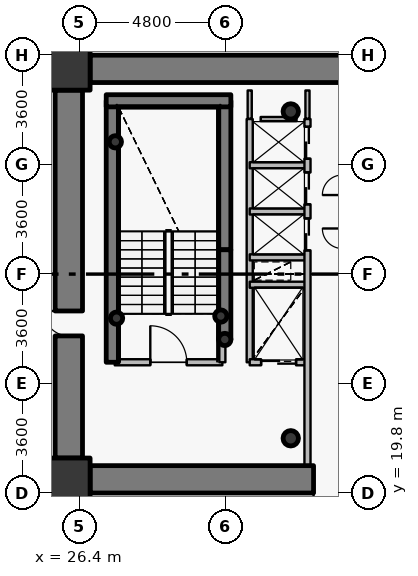
"""IFC4 building model, lengths in metres.
Left out: names, types, materials, properties, quantities, classifications, styles, units other than length and angle.
Written with IfcOpenShell. Run it as: python <this file> out.ifc"""

import sys

from ifc_helpers import new_model, si_unit, direction, frame, frame_2d, origin, origin_2d, place, context, subcontext, project, spatial, rectangle, hollow_circle, extrude, source, transform, mapped, element, fill, save


model = new_model("IFC4")
c1 = context("Model", 3, precision=1e-05, world=origin(), true_north=direction((0.0, 1.0)))
c2 = subcontext(c1, "Body", "Model", "MODEL_VIEW")
j1 = project(units=[si_unit("LENGTHUNIT", "METRE"), si_unit("PLANEANGLEUNIT", "RADIAN")], contexts=[c1])
p1 = place(None, origin())
s1 = spatial("IfcSite", under=j1, at=p1, CompositionType="ELEMENT")
p2 = place(p1, origin())
s2 = spatial("IfcBuilding", under=s1, at=p2, CompositionType="ELEMENT")
p3 = place(p2, origin())
s3 = spatial("IfcBuildingStorey", under=s2, at=p3, CompositionType="ELEMENT", Elevation=0.0)
for number, where, z_axis, x_axis in (
    (1, (26.05, 20.25, 0.0), (0.0, 0.0, 1.0), (1.0, 0.0, 0.0)),
    (2, (26.05, 33.75, 0.0), (0.0, 0.0, 1.0), (1.0, 0.0, 0.0)),
):
    element("IfcColumn", number, at=place(p3, frame(where, z_axis=z_axis, x_axis=x_axis)), inside=s3, PredefinedType="COLUMN", context=c2, shape_type="SweptSolid", body=[
        extrude(rectangle(XDim=1.4, YDim=1.4, at=origin_2d()), origin(), (0.0, 0.0, 1.0), 6.0),
    ])
for number, where, z_axis, x_axis in (
    (3, (33.35, 21.6, 0.0), (0.0, 0.0, 1.0), (1.0, 0.0, 0.0)),
    (4, (33.35, 32.35, 0.0), (0.0, 0.0, 1.0), (1.0, 0.0, 0.0)),
):
    element("IfcColumn", number, at=place(p3, frame(where, z_axis=z_axis, x_axis=x_axis)), inside=s3, PredefinedType="COLUMN", context=c2, shape_type="SweptSolid", body=[
        extrude(hollow_circle(Radius=0.254, WallThickness=0.02, at=origin_2d()), origin(), (0.0, 0.0, 1.0), 6.0),
    ])
p4 = place(p3, frame((27.48, 24.1, 0.0), z_axis=(0.0, 0.0, 1.0), x_axis=(0.0, 1.0, 0.0)))
e5 = element("IfcWall", 5, at=p4, inside=s3, PredefinedType="SHEAR", context=c2, shape_type="SweptSolid", body=[
    extrude(rectangle(XDim=8.6, YDim=0.4, at=frame_2d((4.3, 0.0))), origin(), (0.0, 0.0, 1.0), 6.0),
])
p5 = place(p3, frame((31.18, 27.8, 0.0), z_axis=(0.0, 0.0, 1.0), x_axis=(0.0, 1.0, 0.0)))
e6 = element("IfcWall", 6, at=p5, inside=s3, PredefinedType="SHEAR", context=c2, shape_type="SweptSolid", body=[
    extrude(rectangle(XDim=4.9, YDim=0.4, at=frame_2d((2.45, 0.0))), origin(), (0.0, 0.0, 1.0), 6.0),
])
p6 = place(p3, frame((27.28, 32.7, 0.0), z_axis=(0.0, 0.0, 1.0), x_axis=(1.0, 0.0, 0.0)))
e7 = element("IfcWall", 7, at=p6, inside=s3, PredefinedType="SHEAR", context=c2, shape_type="SweptSolid", body=[
    extrude(rectangle(XDim=4.1, YDim=0.4, at=frame_2d((2.05, 0.0))), origin(), (0.0, 0.0, 1.0), 6.0),
])
for number, where, z_axis, x_axis in (
    (8, (27.58, 31.35, 0.0), (0.0, 0.0, 1.0), (1.0, 0.0, 0.0)),
    (9, (31.05, 25.62, 0.0), (0.0, 0.0, 1.0), (1.0, 0.0, 0.0)),
    (10, (31.18, 24.85, 0.0), (0.0, 0.0, 1.0), (1.0, 0.0, 0.0)),
    (11, (27.62, 25.55, 0.0), (0.0, 0.0, 1.0), (1.0, 0.0, 0.0)),
):
    element("IfcColumn", number, at=place(p3, frame(where, z_axis=z_axis, x_axis=x_axis)), inside=s3, PredefinedType="COLUMN", context=c2, shape_type="SweptSolid", body=[
        extrude(hollow_circle(Radius=0.203, WallThickness=0.016, at=origin_2d()), origin(), (0.0, 0.0, 1.0), 6.0),
    ])
p7 = place(p3, frame((26.75, 33.75, 0.0), z_axis=(0.0, 0.0, 1.0), x_axis=(1.0, 0.0, 0.0)))
e12 = element("IfcWall", 12, at=p7, inside=s3, PredefinedType="SHEAR", context=c2, shape_type="SweptSolid", body=[
    extrude(rectangle(XDim=18.5, YDim=0.9, at=frame_2d((9.25, 0.0))), origin(), (0.0, 0.0, 1.0), 5.15),
])
p8 = place(p3, frame((45.25, 20.25, 0.0), z_axis=(0.0, 0.0, 1.0), x_axis=(-1.0, 0.0, 0.0)))
e13 = element("IfcWall", 13, at=p8, inside=s3, PredefinedType="SHEAR", context=c2, shape_type="SweptSolid", body=[
    extrude(rectangle(XDim=18.5, YDim=0.9, at=frame_2d((9.25, 0.0))), origin(), (0.0, 0.0, 1.0), 5.15),
])
p9 = place(p8, frame((10.0, 0.0, 0.0)))
e14 = element("IfcOpeningElement", 14, at=p9, cuts=e13, PredefinedType="OPENING", context=c2, shape_type="SweptSolid", body=[
    extrude(rectangle(XDim=1.15, YDim=2.15, at=origin_2d()), frame((0.575, 0.46, 1.075), z_axis=(0.0, -1.0, 0.0), x_axis=(1.0, 0.0, 0.0)), (0.0, 0.0, 1.0), 0.92),
])
p10 = place(p3, frame((26.05, 20.95, 0.0), z_axis=(0.0, 0.0, 1.0), x_axis=(0.0, 1.0, 0.0)))
e15 = element("IfcWall", 15, at=p10, inside=s3, PredefinedType="SHEAR", context=c2, shape_type="SweptSolid", body=[
    extrude(rectangle(XDim=12.1, YDim=0.9, at=frame_2d((6.05, 0.0))), origin(), (0.0, 0.0, 1.0), 5.15),
])
p11 = place(p10, frame((4.017, 0.0, 0.0)))
e16 = element("IfcOpeningElement", 16, at=p11, cuts=e15, PredefinedType="OPENING", context=c2, shape_type="SweptSolid", body=[
    extrude(rectangle(XDim=0.82, YDim=2.1, at=origin_2d()), frame((0.41, 0.46, 1.05), z_axis=(0.0, -1.0, 0.0), x_axis=(1.0, 0.0, 0.0)), (0.0, 0.0, 1.0), 0.92),
])
p12 = place(p3, frame((31.18, 24.85, 0.0), z_axis=(0.0, 0.0, 1.0), x_axis=(0.0, 1.0, 0.0)))
e17 = element("IfcWall", 17, at=p12, inside=s3, PredefinedType="SHEAR", context=c2, shape_type="SweptSolid", body=[
    extrude(rectangle(XDim=2.95, YDim=0.4, at=frame_2d((1.475, 0.0))), origin(), (0.0, 0.0, 1.0), 5.3),
])
p13 = place(p3, frame((27.56, 24.1, 0.0), z_axis=(0.0, 0.0, 1.0), x_axis=(1.0, 0.0, 0.0)))
e18 = element("IfcWall", 18, at=p13, inside=s3, PredefinedType="PARTITIONING", context=c2, shape_type="SweptSolid", body=[
    extrude(rectangle(XDim=3.54, YDim=0.2, at=frame_2d((1.77, 0.0))), origin(), (0.0, 0.0, 1.0), 5.7),
])
p14 = place(p13, frame((1.17, 0.0, 0.0)))
e19 = element("IfcOpeningElement", 19, at=p14, cuts=e18, PredefinedType="OPENING", context=c2, shape_type="SweptSolid", body=[
    extrude(rectangle(XDim=1.2, YDim=2.15, at=origin_2d()), frame((0.6, 0.11, 1.075), z_axis=(0.0, -1.0, 0.0), x_axis=(1.0, 0.0, 0.0)), (0.0, 0.0, 1.0), 0.22),
])
p15 = place(p3, frame((31.1, 24.1, 0.0), z_axis=(0.0, 0.0, 1.0), x_axis=(0.0, 1.0, 0.0)))
e20 = element("IfcWall", 20, at=p15, inside=s3, PredefinedType="PARTITIONING", context=c2, shape_type="SweptSolid", body=[
    extrude(rectangle(XDim=0.74, YDim=0.2, at=frame_2d((0.37, 0.0))), origin(), (0.0, 0.0, 1.0), 5.7),
])
p16 = place(p3, frame((32.0, 24.1, 0.0), z_axis=(0.0, 0.0, 1.0), x_axis=(0.0, 1.0, 0.0)))
e21 = element("IfcWall", 21, at=p16, inside=s3, PredefinedType="PARTITIONING", context=c2, shape_type="SweptSolid", body=[
    extrude(rectangle(XDim=8.0, YDim=0.2, at=frame_2d((4.0, 0.0))), origin(), (0.0, 0.0, 1.0), 5.7),
])
p17 = place(p3, frame((32.0, 24.1, 0.0), z_axis=(0.0, 0.0, 1.0), x_axis=(1.0, 0.0, 0.0)))
e22 = element("IfcWall", 22, at=p17, inside=s3, PredefinedType="PARTITIONING", context=c2, shape_type="SweptSolid", body=[
    extrude(rectangle(XDim=1.9, YDim=0.2, at=frame_2d((0.95, 0.0))), origin(), (0.0, 0.0, 1.0), 5.285),
])
p18 = place(p17, frame((0.375, 0.0, 0.0)))
e23 = element("IfcOpeningElement", 23, at=p18, cuts=e22, PredefinedType="OPENING", context=c2, shape_type="SweptSolid", body=[
    extrude(rectangle(XDim=1.15, YDim=2.15, at=origin_2d()), frame((0.575, 0.11, 1.075), z_axis=(0.0, -1.0, 0.0), x_axis=(1.0, 0.0, 0.0)), (0.0, 0.0, 1.0), 0.22),
])
for number, where, z_axis, x_axis in (
    (24, (32.0, 26.65, 0.0), (0.0, 0.0, 1.0), (1.0, 0.0, 0.0)),
    (25, (32.0, 27.55, 0.0), (0.0, 0.0, 1.0), (1.0, 0.0, 0.0)),
    (26, (32.0, 29.06, 0.0), (0.0, 0.0, 1.0), (1.0, 0.0, 0.0)),
    (27, (32.0, 30.58, 0.0), (0.0, 0.0, 1.0), (1.0, 0.0, 0.0)),
):
    element("IfcWall", number, at=place(p3, frame(where, z_axis=z_axis, x_axis=x_axis)), inside=s3, PredefinedType="PARTITIONING", context=c2, shape_type="SweptSolid", body=[
        extrude(rectangle(XDim=1.9, YDim=0.2, at=frame_2d((0.95, 0.0))), origin(), (0.0, 0.0, 1.0), 5.285),
    ])
p19 = place(p3, frame((33.9, 20.7, 0.0), z_axis=(0.0, 0.0, 1.0), x_axis=(0.0, 1.0, 0.0)))
e28 = element("IfcWall", 28, at=p19, inside=s3, PredefinedType="PARTITIONING", context=c2, shape_type="SweptSolid", body=[
    extrude(rectangle(XDim=11.4, YDim=0.2, at=frame_2d((5.7, 0.0))), origin(), (0.0, 0.0, 1.0), 5.285),
])
p20 = place(p19, frame((7.08, 0.0, 0.0)))
e29 = element("IfcOpeningElement", 29, at=p20, cuts=e28, PredefinedType="OPENING", context=c2, shape_type="SweptSolid", body=[
    extrude(rectangle(XDim=1.05, YDim=2.15, at=origin_2d()), frame((0.525, 0.11, 1.075), z_axis=(0.0, -1.0, 0.0), x_axis=(1.0, 0.0, 0.0)), (0.0, 0.0, 1.0), 0.22),
])
p21 = place(p19, frame((8.595, 0.0, 0.0)))
e30 = element("IfcOpeningElement", 30, at=p21, cuts=e28, PredefinedType="OPENING", context=c2, shape_type="SweptSolid", body=[
    extrude(rectangle(XDim=1.05, YDim=2.15, at=origin_2d()), frame((0.525, 0.11, 1.075), z_axis=(0.0, -1.0, 0.0), x_axis=(1.0, 0.0, 0.0)), (0.0, 0.0, 1.0), 0.22),
])
p22 = place(p19, frame((10.095, 0.0, 0.0)))
e31 = element("IfcOpeningElement", 31, at=p22, cuts=e28, PredefinedType="OPENING", context=c2, shape_type="SweptSolid", body=[
    extrude(rectangle(XDim=1.05, YDim=2.15, at=origin_2d()), frame((0.525, 0.11, 1.075), z_axis=(0.0, -1.0, 0.0), x_axis=(1.0, 0.0, 0.0)), (0.0, 0.0, 1.0), 0.22),
])
p23 = place(p3, frame((32.36, 32.1, 0.0), z_axis=(0.0, 0.0, 1.0), x_axis=(1.0, 0.0, 0.0)))
e32 = element("IfcWall", 32, at=p23, inside=s3, PredefinedType="PARTITIONING", context=c2, shape_type="SweptSolid", body=[
    extrude(rectangle(XDim=1.18, YDim=0.135, at=frame_2d((0.59, 0.0))), origin(), (0.0, 0.0, 1.0), 5.285),
])
p24 = place(p3, frame((32.0, 33.04, 0.0), z_axis=(0.0, 0.0, 1.0), x_axis=(0.0, -1.0, 0.0)))
e33 = element("IfcWall", 33, at=p24, inside=s3, PredefinedType="PARTITIONING", context=c2, shape_type="SweptSolid", body=[
    extrude(rectangle(XDim=0.93, YDim=0.135, at=frame_2d((0.465, 0.0))), origin(), (0.0, 0.0, 1.0), 5.235),
])
p25 = place(p3, frame((33.9, 32.11, 0.0), z_axis=(0.0, 0.0, 1.0), x_axis=(0.0, 1.0, 0.0)))
e34 = element("IfcWall", 34, at=p25, inside=s3, PredefinedType="PARTITIONING", context=c2, shape_type="SweptSolid", body=[
    extrude(rectangle(XDim=0.93, YDim=0.135, at=frame_2d((0.465, 0.0))), origin(), (0.0, 0.0, 1.0), 5.285),
])
p26 = place(p3, frame((26.74, 34.2, 0.0), z_axis=(0.0, 0.0, 1.0), x_axis=(-1.0, 0.0, 0.0)))
e35 = element("IfcWall", 35, at=p26, inside=s3, PredefinedType="PARTITIONING", context=c2, shape_type="SweptSolid", body=[
    extrude(rectangle(XDim=1.14, YDim=0.135, at=frame_2d((0.57, 0.0))), origin(), (0.0, 0.0, 1.0), 4.885),
])
p27 = place(p3, frame((25.6, 33.893, 0.0), z_axis=(0.0, 0.0, 1.0), x_axis=(0.0, -1.0, 0.0)))
e36 = element("IfcWall", 36, at=p27, inside=s3, PredefinedType="PARTITIONING", context=c2, shape_type="SweptSolid", body=[
    extrude(rectangle(XDim=0.833, YDim=0.135, at=frame_2d((0.416, 0.0))), origin(), (0.0, 0.0, 1.0), 5.7),
])
p28 = place(p3, frame((25.6, 20.94, 0.0), z_axis=(0.0, 0.0, 1.0), x_axis=(0.0, -1.0, 0.0)))
e37 = element("IfcWall", 37, at=p28, inside=s3, PredefinedType="PARTITIONING", context=c2, shape_type="SweptSolid", body=[
    extrude(rectangle(XDim=1.14, YDim=0.135, at=frame_2d((0.57, 0.0))), origin(), (0.0, 0.0, 1.0), 5.7),
])
p29 = place(p3, frame((25.907, 19.8, 0.0), z_axis=(0.0, 0.0, 1.0), x_axis=(1.0, 0.0, 0.0)))
e38 = element("IfcWall", 38, at=p29, inside=s3, PredefinedType="PARTITIONING", context=c2, shape_type="SweptSolid", body=[
    extrude(rectangle(XDim=0.833, YDim=0.135, at=frame_2d((0.416, 0.0))), origin(), (0.0, 0.0, 1.0), 4.885),
])
m1 = source(origin(), c2, "Body", "SweptSolid", [
    extrude(rectangle(XDim=0.82, YDim=2.1, at=origin_2d()), frame((0.41, 0.025, 1.05), z_axis=(0.0, -1.0, 0.0), x_axis=(1.0, 0.0, 0.0)), (0.0, 0.0, 1.0), 0.05),
])
p30 = place(p11, origin())
e39 = element("IfcDoor", 39, at=p30, inside=s3, OperationType="SINGLE_SWING_RIGHT", PredefinedType="DOOR", context=c2, shape_type="MappedRepresentation", body=[
    mapped(m1, transform((0.0, 0.0, 0.0), x_axis=(1.0, 0.0, 0.0), y_axis=(0.0, 1.0, 0.0), z_axis=(0.0, 0.0, 1.0), scale=1.0)),
])
fill(e16, e39)
m2 = source(origin(), c2, "Body", "SweptSolid", [
    extrude(rectangle(XDim=1.15, YDim=2.15, at=origin_2d()), frame((0.575, 0.025, 1.075), z_axis=(0.0, -1.0, 0.0), x_axis=(1.0, 0.0, 0.0)), (0.0, 0.0, 1.0), 0.05),
])
p31 = place(p9, origin())
e40 = element("IfcDoor", 40, at=p31, inside=s3, OperationType="SINGLE_SWING_RIGHT", PredefinedType="DOOR", context=c2, shape_type="MappedRepresentation", body=[
    mapped(m2, transform((0.0, 0.0, 0.0), x_axis=(1.0, 0.0, 0.0), y_axis=(0.0, 1.0, 0.0), z_axis=(0.0, 0.0, 1.0), scale=1.0)),
])
fill(e14, e40)
m3 = source(origin(), c2, "Body", "SweptSolid", [
    extrude(rectangle(XDim=1.2, YDim=2.15, at=origin_2d()), frame((0.6, 0.025, 1.075), z_axis=(0.0, -1.0, 0.0), x_axis=(1.0, 0.0, 0.0)), (0.0, 0.0, 1.0), 0.05),
])
p32 = place(p14, origin())
e41 = element("IfcDoor", 41, at=p32, inside=s3, OperationType="SINGLE_SWING_LEFT", PredefinedType="DOOR", context=c2, shape_type="MappedRepresentation", body=[
    mapped(m3, transform((0.0, 0.0, 0.0), x_axis=(1.0, 0.0, 0.0), y_axis=(0.0, 1.0, 0.0), z_axis=(0.0, 0.0, 1.0), scale=1.0)),
])
fill(e19, e41)
m4 = source(origin(), c2, "Body", "SweptSolid", [
    extrude(rectangle(XDim=1.15, YDim=2.15, at=origin_2d()), frame((0.575, 0.025, 1.075), z_axis=(0.0, -1.0, 0.0), x_axis=(1.0, 0.0, 0.0)), (0.0, 0.0, 1.0), 0.05),
])
p33 = place(p18, origin())
e42 = element("IfcDoor", 42, at=p33, inside=s3, OperationType="DOUBLE_DOOR_SLIDING", PredefinedType="USERDEFINED", context=c2, shape_type="MappedRepresentation", body=[
    mapped(m4, transform((0.0, 0.0, 0.0), x_axis=(1.0, 0.0, 0.0), y_axis=(0.0, 1.0, 0.0), z_axis=(0.0, 0.0, 1.0), scale=1.0)),
])
fill(e23, e42)
m5 = source(origin(), c2, "Body", "SweptSolid", [
    extrude(rectangle(XDim=1.05, YDim=2.15, at=origin_2d()), frame((0.525, 0.025, 1.075), z_axis=(0.0, -1.0, 0.0), x_axis=(1.0, 0.0, 0.0)), (0.0, 0.0, 1.0), 0.05),
])
p34 = place(p20, origin())
e43 = element("IfcDoor", 43, at=p34, inside=s3, OperationType="DOUBLE_DOOR_SLIDING", PredefinedType="USERDEFINED", context=c2, shape_type="MappedRepresentation", body=[
    mapped(m5, transform((0.0, 0.0, 0.0), x_axis=(1.0, 0.0, 0.0), y_axis=(0.0, 1.0, 0.0), z_axis=(0.0, 0.0, 1.0), scale=1.0)),
])
fill(e29, e43)
p35 = place(p21, origin())
e44 = element("IfcDoor", 44, at=p35, inside=s3, OperationType="DOUBLE_DOOR_SLIDING", PredefinedType="USERDEFINED", context=c2, shape_type="MappedRepresentation", body=[
    mapped(m5, transform((0.0, 0.0, 0.0), x_axis=(1.0, 0.0, 0.0), y_axis=(0.0, 1.0, 0.0), z_axis=(0.0, 0.0, 1.0), scale=1.0)),
])
fill(e30, e44)
p36 = place(p22, origin())
e45 = element("IfcDoor", 45, at=p36, inside=s3, OperationType="DOUBLE_DOOR_SLIDING", PredefinedType="USERDEFINED", context=c2, shape_type="MappedRepresentation", body=[
    mapped(m5, transform((0.0, 0.0, 0.0), x_axis=(1.0, 0.0, 0.0), y_axis=(0.0, 1.0, 0.0), z_axis=(0.0, 0.0, 1.0), scale=1.0)),
])
fill(e31, e45)
save(model, sys.argv[1])
